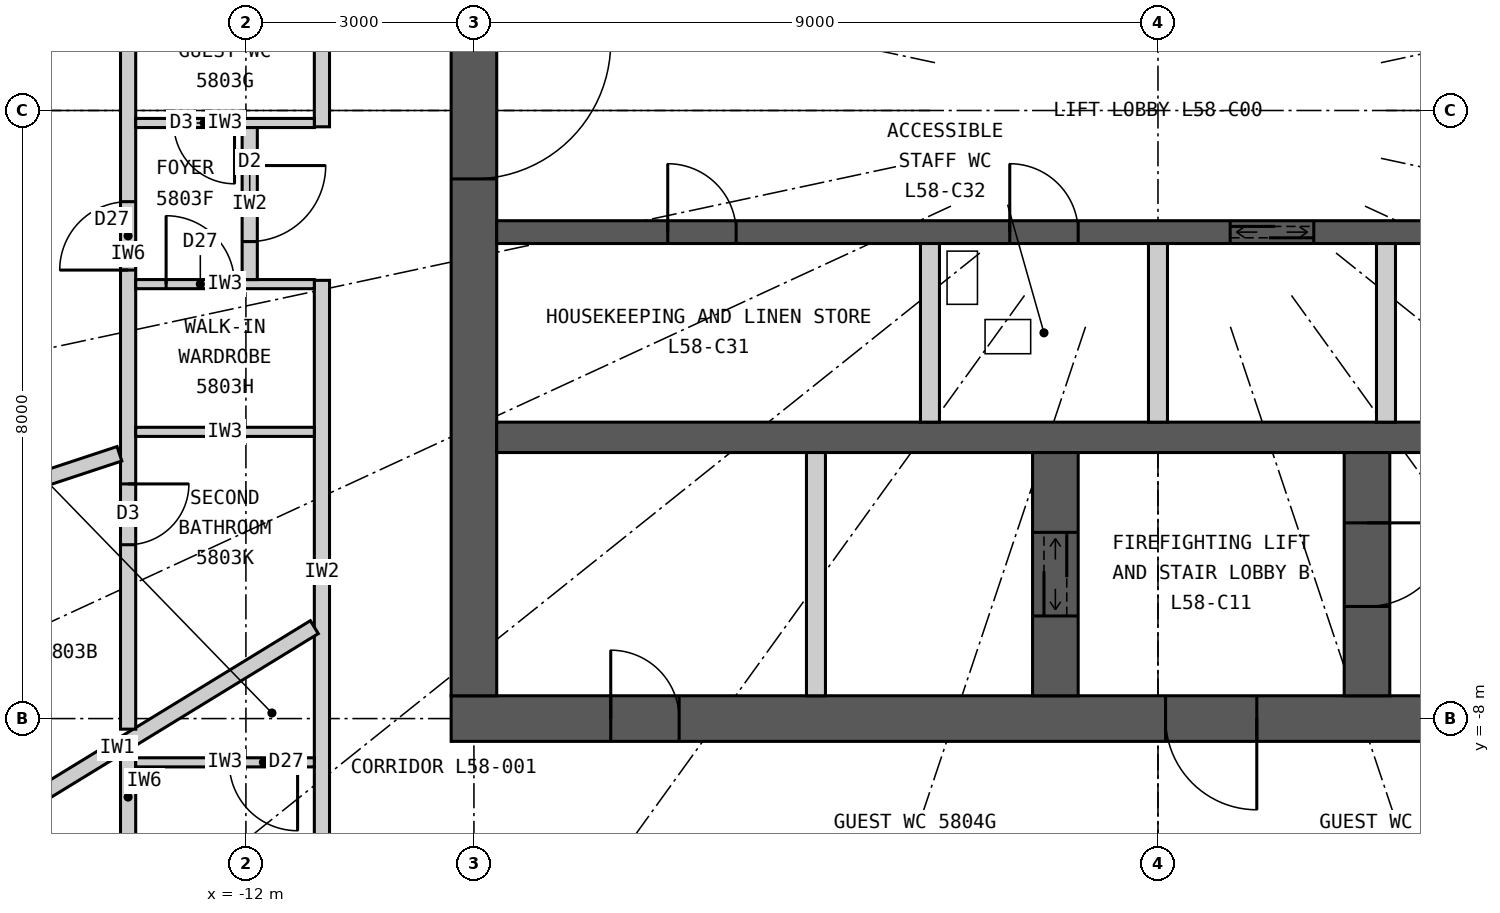
"""IFC4 building model, lengths in metres.
Left out: names, types, materials, properties, quantities, classifications, styles, units other than length and angle.
Written with IfcOpenShell. Run it as: python <this file> out.ifc"""

import sys

from ifc_helpers import new_model, si_unit, direction, frame, frame_2d, origin, place, context, subcontext, project, spatial, rectangle, extrude, element, fill, save


model = new_model("IFC4")
c1 = context("Model", 3, precision=1e-05, world=origin(), true_north=direction((0.0, 1.0)))
c2 = subcontext(c1, "Body", "Model", "MODEL_VIEW")
j1 = project(units=[si_unit("LENGTHUNIT", "METRE"), si_unit("PLANEANGLEUNIT", "RADIAN")], contexts=[c1])
p1 = place(None, origin())
s1 = spatial("IfcSite", under=j1, at=p1, CompositionType="ELEMENT")
p2 = place(p1, origin())
s2 = spatial("IfcBuilding", under=s1, at=p2, CompositionType="ELEMENT")
p3 = place(p2, frame((0.0, 0.0, 216.0)))
s3 = spatial("IfcBuildingStorey", under=s2, at=p3, CompositionType="ELEMENT", Elevation=216.0)
p4 = place(p3, frame((9.3, -8.0, 0.0), z_axis=(0.0, 0.0, 1.0), x_axis=(-1.0, 0.0, 0.0)))
e1 = element("IfcWall", 1, at=p4, inside=s3, PredefinedType="SHEAR", context=c2, shape_type="SweptSolid", body=[
    extrude(rectangle(XDim=18.6, YDim=0.6, at=frame_2d((9.3, 0.0))), origin(), (0.0, 0.0, 1.0), 3.3),
])
p5 = place(p4, frame((8.0, 0.0, 0.0)))
e2 = element("IfcOpeningElement", 2, at=p5, cuts=e1, PredefinedType="OPENING", context=c2, shape_type="SweptSolid", body=[
    extrude(rectangle(XDim=1.2, YDim=2.2, at=frame_2d((0.6, 1.1))), frame((0.0, 0.31, 0.0), z_axis=(0.0, -1.0, 0.0), x_axis=(1.0, 0.0, 0.0)), (0.0, 0.0, 1.0), 0.62),
])
p6 = place(p4, frame((15.6, 0.0, 0.0)))
e3 = element("IfcOpeningElement", 3, at=p6, cuts=e1, PredefinedType="OPENING", context=c2, shape_type="SweptSolid", body=[
    extrude(rectangle(XDim=0.9, YDim=2.2, at=frame_2d((0.45, 1.1))), frame((0.0, 0.31, 0.0), z_axis=(0.0, -1.0, 0.0), x_axis=(1.0, 0.0, 0.0)), (0.0, 0.0, 1.0), 0.62),
])
p7 = place(p3, frame((-9.0, 7.7, 0.0), z_axis=(0.0, 0.0, 1.0), x_axis=(0.0, -1.0, 0.0)))
e4 = element("IfcWall", 4, at=p7, inside=s3, PredefinedType="SHEAR", context=c2, shape_type="SweptSolid", body=[
    extrude(rectangle(XDim=15.4, YDim=0.6, at=frame_2d((7.7, 0.0))), origin(), (0.0, 0.0, 1.0), 3.3),
])
p8 = place(p7, frame((6.8, 0.0, 0.0)))
e5 = element("IfcOpeningElement", 5, at=p8, cuts=e4, PredefinedType="OPENING", context=c2, shape_type="SweptSolid", body=[
    extrude(rectangle(XDim=1.8, YDim=2.2, at=frame_2d((0.9, 1.1))), frame((0.0, 0.31, 0.0), z_axis=(0.0, -1.0, 0.0), x_axis=(1.0, 0.0, 0.0)), (0.0, 0.0, 1.0), 0.62),
])
p9 = place(p3, frame((-8.7, -4.3, 0.0), z_axis=(0.0, 0.0, 1.0), x_axis=(1.0, 0.0, 0.0)))
e6 = element("IfcWall", 6, at=p9, inside=s3, PredefinedType="SHEAR", context=c2, shape_type="SweptSolid", body=[
    extrude(rectangle(XDim=17.4, YDim=0.4, at=frame_2d((8.7, 0.0))), origin(), (0.0, 0.0, 1.0), 3.3),
])
p10 = place(p3, frame((-8.7, -1.6, 0.0), z_axis=(0.0, 0.0, 1.0), x_axis=(1.0, 0.0, 0.0)))
e7 = element("IfcWall", 7, at=p10, inside=s3, PredefinedType="SHEAR", context=c2, shape_type="SweptSolid", body=[
    extrude(rectangle(XDim=17.4, YDim=0.3, at=frame_2d((8.7, 0.0))), origin(), (0.0, 0.0, 1.0), 3.3),
])
p11 = place(p10, frame((9.65, 0.0, 0.0)))
e8 = element("IfcOpeningElement", 8, at=p11, cuts=e7, PredefinedType="OPENING", context=c2, shape_type="SweptSolid", body=[
    extrude(rectangle(XDim=1.1, YDim=2.2, at=frame_2d((0.55, 1.1))), frame((0.0, 0.16, 0.0), z_axis=(0.0, -1.0, 0.0), x_axis=(1.0, 0.0, 0.0)), (0.0, 0.0, 1.0), 0.32),
])
p12 = place(p10, frame((12.4, 0.0, 0.0)))
e9 = element("IfcOpeningElement", 9, at=p12, cuts=e7, PredefinedType="OPENING", context=c2, shape_type="SweptSolid", body=[
    extrude(rectangle(XDim=1.6, YDim=2.4, at=frame_2d((0.8, 1.2))), frame((0.0, 0.16, 0.0), z_axis=(0.0, -1.0, 0.0), x_axis=(1.0, 0.0, 0.0)), (0.0, 0.0, 1.0), 0.32),
])
p13 = place(p10, frame((2.25, 0.0, 0.0)))
e10 = element("IfcOpeningElement", 10, at=p13, cuts=e7, PredefinedType="OPENING", context=c2, shape_type="SweptSolid", body=[
    extrude(rectangle(XDim=0.9, YDim=2.2, at=frame_2d((0.45, 1.1))), frame((0.0, 0.16, 0.0), z_axis=(0.0, -1.0, 0.0), x_axis=(1.0, 0.0, 0.0)), (0.0, 0.0, 1.0), 0.32),
])
p14 = place(p10, frame((6.75, 0.0, 0.0)))
e11 = element("IfcOpeningElement", 11, at=p14, cuts=e7, PredefinedType="OPENING", context=c2, shape_type="SweptSolid", body=[
    extrude(rectangle(XDim=0.9, YDim=2.2, at=frame_2d((0.45, 1.1))), frame((0.0, 0.16, 0.0), z_axis=(0.0, -1.0, 0.0), x_axis=(1.0, 0.0, 0.0)), (0.0, 0.0, 1.0), 0.32),
])
p15 = place(p3, frame((2.75, -7.7, 0.0), z_axis=(0.0, 0.0, 1.0), x_axis=(0.0, 1.0, 0.0)))
e12 = element("IfcWall", 12, at=p15, inside=s3, PredefinedType="SHEAR", context=c2, shape_type="SweptSolid", body=[
    extrude(rectangle(XDim=3.2, YDim=0.6, at=frame_2d((1.6, 0.0))), origin(), (0.0, 0.0, 1.0), 3.3),
])
p16 = place(p15, frame((1.175, 0.0, 0.0)))
e13 = element("IfcOpeningElement", 13, at=p16, cuts=e12, PredefinedType="OPENING", context=c2, shape_type="SweptSolid", body=[
    extrude(rectangle(XDim=1.1, YDim=2.2, at=frame_2d((0.55, 1.1))), frame((0.0, 0.31, 0.0), z_axis=(0.0, -1.0, 0.0), x_axis=(1.0, 0.0, 0.0)), (0.0, 0.0, 1.0), 0.62),
])
p17 = place(p3, frame((-1.35, -7.7, 0.0), z_axis=(0.0, 0.0, 1.0), x_axis=(0.0, 1.0, 0.0)))
e14 = element("IfcWall", 14, at=p17, inside=s3, PredefinedType="SHEAR", context=c2, shape_type="SweptSolid", body=[
    extrude(rectangle(XDim=3.2, YDim=0.6, at=frame_2d((1.6, 0.0))), origin(), (0.0, 0.0, 1.0), 3.3),
])
p18 = place(p17, frame((1.05, 0.0, 0.0)))
e15 = element("IfcOpeningElement", 15, at=p18, cuts=e14, PredefinedType="OPENING", context=c2, shape_type="SweptSolid", body=[
    extrude(rectangle(XDim=1.1, YDim=2.2, at=frame_2d((0.55, 1.1))), frame((0.0, 0.31, 0.0), z_axis=(0.0, -1.0, 0.0), x_axis=(1.0, 0.0, 0.0)), (0.0, 0.0, 1.0), 0.62),
])
p19 = place(p3, frame((-4.5, -7.7, 0.0), z_axis=(0.0, 0.0, 1.0), x_axis=(0.0, 1.0, 0.0)))
e16 = element("IfcWall", 16, at=p19, inside=s3, PredefinedType="PARTITIONING", context=c2, shape_type="SweptSolid", body=[
    extrude(rectangle(XDim=3.2, YDim=0.25, at=frame_2d((1.6, 0.0))), origin(), (0.0, 0.0, 1.0), 3.3),
])
for number, where, z_axis, x_axis in (
    (17, (-3.0, -4.1, 0.0), (0.0, 0.0, 1.0), (0.0, 1.0, 0.0)),
    (18, (0.0, -4.1, 0.0), (0.0, 0.0, 1.0), (0.0, 1.0, 0.0)),
    (19, (3.0, -4.1, 0.0), (0.0, 0.0, 1.0), (0.0, 1.0, 0.0)),
):
    element("IfcWall", number, at=place(p3, frame(where, z_axis=z_axis, x_axis=x_axis)), inside=s3, PredefinedType="PARTITIONING", context=c2, shape_type="SweptSolid", body=[
        extrude(rectangle(XDim=2.35, YDim=0.25, at=frame_2d((1.175, 0.0))), origin(), (0.0, 0.0, 1.0), 3.3),
    ])
p20 = place(p3, frame((-11.0, 9.9, 0.0), z_axis=(0.0, 0.0, 1.0), x_axis=(0.0, -1.0, 0.0)))
e20 = element("IfcWall", 20, at=p20, inside=s3, PredefinedType="PARTITIONING", context=c2, shape_type="SweptSolid", body=[
    extrude(rectangle(XDim=10.114, YDim=0.2, at=frame_2d((5.057, 0.0))), origin(), (0.0, 0.0, 1.0), 3.12),
])
p21 = place(p3, frame((-11.0, -2.234, 0.0), z_axis=(0.0, 0.0, 1.0), x_axis=(0.0, -1.0, 0.0)))
e21 = element("IfcWall", 21, at=p21, inside=s3, PredefinedType="PARTITIONING", context=c2, shape_type="SweptSolid", body=[
    extrude(rectangle(XDim=7.666, YDim=0.2, at=frame_2d((3.833, 0.0))), origin(), (0.0, 0.0, 1.0), 3.12),
])
p22 = place(p3, frame((-11.1, -6.797, 0.0), z_axis=(0.0, 0.0, 1.0), x_axis=(-0.852799818179, -0.522237943963, 0.0)))
e22 = element("IfcWall", 22, at=p22, inside=s3, PredefinedType="PARTITIONING", context=c2, shape_type="SweptSolid", body=[
    extrude(rectangle(XDim=6.077, YDim=0.2, at=frame_2d((3.039, 0.0))), origin(), (0.0, 0.0, 1.0), 3.12),
])
p23 = place(p3, frame((-13.55, 4.357, 0.0), z_axis=(0.0, 0.0, 1.0), x_axis=(0.0, -1.0, 0.0)))
e23 = element("IfcWall", 23, at=p23, inside=s3, PredefinedType="PARTITIONING", context=c2, shape_type="SweptSolid", body=[
    extrude(rectangle(XDim=12.496, YDim=0.2, at=frame_2d((6.248, 0.0))), origin(), (0.0, 0.0, 1.0), 3.12),
])
p24 = place(p23, frame((1.92, 0.0, 0.0)))
e24 = element("IfcOpeningElement", 24, at=p24, cuts=e23, PredefinedType="OPENING", context=c2, shape_type="SweptSolid", body=[
    extrude(rectangle(XDim=0.8, YDim=2.1, at=frame_2d((0.4, 1.05))), frame((0.0, 0.11, 0.0), z_axis=(0.0, -1.0, 0.0), x_axis=(1.0, 0.0, 0.0)), (0.0, 0.0, 1.0), 0.22),
])
p25 = place(p23, frame((9.27, 0.0, 0.0)))
e25 = element("IfcOpeningElement", 25, at=p25, cuts=e23, PredefinedType="OPENING", context=c2, shape_type="SweptSolid", body=[
    extrude(rectangle(XDim=0.8, YDim=2.1, at=frame_2d((0.4, 1.05))), frame((0.0, 0.11, 0.0), z_axis=(0.0, -1.0, 0.0), x_axis=(1.0, 0.0, 0.0)), (0.0, 0.0, 1.0), 0.22),
])
p26 = place(p23, frame((5.557, 0.0, 0.0)))
e26 = element("IfcOpeningElement", 26, at=p26, cuts=e23, PredefinedType="OPENING", context=c2, shape_type="SweptSolid", body=[
    extrude(rectangle(XDim=0.9, YDim=2.1, at=frame_2d((0.45, 1.05))), frame((0.0, 0.11, 0.0), z_axis=(0.0, -1.0, 0.0), x_axis=(1.0, 0.0, 0.0)), (0.0, 0.0, 1.0), 0.22),
])
p27 = place(p3, frame((-13.664, -4.516, 0.0), z_axis=(0.0, 0.0, 1.0), x_axis=(-0.949481375941, -0.313823384632, 0.0)))
e27 = element("IfcWall", 27, at=p27, inside=s3, PredefinedType="PARTITIONING", context=c2, shape_type="SweptSolid", body=[
    extrude(rectangle(XDim=5.638, YDim=0.2, at=frame_2d((2.819, 0.0))), origin(), (0.0, 0.0, 1.0), 3.12),
])
p28 = place(p27, frame((1.82, 0.0, 0.0)))
e28 = element("IfcOpeningElement", 28, at=p28, cuts=e27, PredefinedType="OPENING", context=c2, shape_type="SweptSolid", body=[
    extrude(rectangle(XDim=0.9, YDim=2.1, at=frame_2d((0.45, 1.05))), frame((0.0, 0.11, 0.0), z_axis=(0.0, -1.0, 0.0), x_axis=(1.0, 0.0, 0.0)), (0.0, 0.0, 1.0), 0.22),
])
p29 = place(p3, frame((-11.1, -0.164, 0.0), z_axis=(0.0, 0.0, 1.0), x_axis=(-1.0, 0.0, 0.0)))
e29 = element("IfcWall", 29, at=p29, inside=s3, PredefinedType="PARTITIONING", context=c2, shape_type="SweptSolid", body=[
    extrude(rectangle(XDim=2.35, YDim=0.12, at=frame_2d((1.175, 0.0))), origin(), (0.0, 0.0, 1.0), 3.12),
])
p30 = place(p29, frame((1.05, 0.0, 0.0)))
e30 = element("IfcOpeningElement", 30, at=p30, cuts=e29, PredefinedType="OPENING", context=c2, shape_type="SweptSolid", body=[
    extrude(rectangle(XDim=0.8, YDim=2.1, at=frame_2d((0.4, 1.05))), frame((0.0, 0.07, 0.0), z_axis=(0.0, -1.0, 0.0), x_axis=(1.0, 0.0, 0.0)), (0.0, 0.0, 1.0), 0.14),
])
p31 = place(p3, frame((-11.1, -2.284, 0.0), z_axis=(0.0, 0.0, 1.0), x_axis=(-1.0, 0.0, 0.0)))
e31 = element("IfcWall", 31, at=p31, inside=s3, PredefinedType="PARTITIONING", context=c2, shape_type="SweptSolid", body=[
    extrude(rectangle(XDim=2.35, YDim=0.12, at=frame_2d((1.175, 0.0))), origin(), (0.0, 0.0, 1.0), 3.12),
])
p32 = place(p31, frame((1.05, 0.0, 0.0)))
e32 = element("IfcOpeningElement", 32, at=p32, cuts=e31, PredefinedType="OPENING", context=c2, shape_type="SweptSolid", body=[
    extrude(rectangle(XDim=0.9, YDim=2.1, at=frame_2d((0.45, 1.05))), frame((0.0, 0.07, 0.0), z_axis=(0.0, -1.0, 0.0), x_axis=(1.0, 0.0, 0.0)), (0.0, 0.0, 1.0), 0.14),
])
p33 = place(p3, frame((-11.1, -4.228, 0.0), z_axis=(0.0, 0.0, 1.0), x_axis=(-1.0, 0.0, 0.0)))
e33 = element("IfcWall", 33, at=p33, inside=s3, PredefinedType="PARTITIONING", context=c2, shape_type="SweptSolid", body=[
    extrude(rectangle(XDim=2.35, YDim=0.12, at=frame_2d((1.175, 0.0))), origin(), (0.0, 0.0, 1.0), 3.12),
])
p34 = place(p3, frame((-11.95, -0.224, 0.0), z_axis=(0.0, 0.0, 1.0), x_axis=(0.0, -1.0, 0.0)))
e34 = element("IfcWall", 34, at=p34, inside=s3, PredefinedType="PARTITIONING", context=c2, shape_type="SweptSolid", body=[
    extrude(rectangle(XDim=2.0, YDim=0.2, at=frame_2d((1.0, 0.0))), origin(), (0.0, 0.0, 1.0), 3.12),
])
p35 = place(p34, frame((0.5, 0.0, 0.0)))
e35 = element("IfcOpeningElement", 35, at=p35, cuts=e34, PredefinedType="OPENING", context=c2, shape_type="SweptSolid", body=[
    extrude(rectangle(XDim=1.0, YDim=2.2, at=frame_2d((0.5, 1.1))), frame((0.0, 0.11, 0.0), z_axis=(0.0, -1.0, 0.0), x_axis=(1.0, 0.0, 0.0)), (0.0, 0.0, 1.0), 0.22),
])
p36 = place(p3, frame((-13.55, -8.456, 0.0), z_axis=(0.0, 0.0, 1.0), x_axis=(0.0, -1.0, 0.0)))
e36 = element("IfcWall", 36, at=p36, inside=s3, PredefinedType="PARTITIONING", context=c2, shape_type="SweptSolid", body=[
    extrude(rectangle(XDim=1.153, YDim=0.2, at=frame_2d((0.576, 0.0))), origin(), (0.0, 0.0, 1.0), 3.12),
])
p37 = place(p3, frame((-11.1, -8.576, 0.0), z_axis=(0.0, 0.0, 1.0), x_axis=(-1.0, 0.0, 0.0)))
e37 = element("IfcWall", 37, at=p37, inside=s3, PredefinedType="PARTITIONING", context=c2, shape_type="SweptSolid", body=[
    extrude(rectangle(XDim=2.35, YDim=0.12, at=frame_2d((1.175, 0.0))), origin(), (0.0, 0.0, 1.0), 3.12),
])
p38 = place(p37, frame((0.22, 0.0, 0.0)))
e38 = element("IfcOpeningElement", 38, at=p38, cuts=e37, PredefinedType="OPENING", context=c2, shape_type="SweptSolid", body=[
    extrude(rectangle(XDim=0.9, YDim=2.1, at=frame_2d((0.45, 1.05))), frame((0.0, 0.07, 0.0), z_axis=(0.0, -1.0, 0.0), x_axis=(1.0, 0.0, 0.0)), (0.0, 0.0, 1.0), 0.14),
])
p39 = place(p35, origin())
e39 = element("IfcDoor", 39, at=p39, inside=s3, OperationType="SINGLE_SWING_LEFT", PredefinedType="DOOR", context=c2, shape_type="SweptSolid", body=[
    extrude(rectangle(XDim=1.0, YDim=2.2, at=frame_2d((0.5, 1.1))), frame((0.0, 0.025, 0.0), z_axis=(0.0, -1.0, 0.0), x_axis=(1.0, 0.0, 0.0)), (0.0, 0.0, 1.0), 0.05),
])
fill(e35, e39)
p40 = place(p30, origin())
e40 = element("IfcDoor", 40, at=p40, inside=s3, OperationType="SINGLE_SWING_LEFT", PredefinedType="DOOR", context=c2, shape_type="SweptSolid", body=[
    extrude(rectangle(XDim=0.8, YDim=2.1, at=frame_2d((0.4, 1.05))), frame((0.0, 0.025, 0.0), z_axis=(0.0, -1.0, 0.0), x_axis=(1.0, 0.0, 0.0)), (0.0, 0.0, 1.0), 0.05),
])
fill(e30, e40)
p41 = place(p32, origin())
e41 = element("IfcDoor", 41, at=p41, inside=s3, OperationType="SINGLE_SWING_RIGHT", PredefinedType="DOOR", context=c2, shape_type="SweptSolid", body=[
    extrude(rectangle(XDim=0.9, YDim=2.1, at=frame_2d((0.45, 1.05))), frame((0.0, 0.025, 0.0), z_axis=(0.0, -1.0, 0.0), x_axis=(1.0, 0.0, 0.0)), (0.0, 0.0, 1.0), 0.05),
])
fill(e32, e41)
p42 = place(p25, origin())
e42 = element("IfcDoor", 42, at=p42, inside=s3, OperationType="SINGLE_SWING_LEFT", PredefinedType="DOOR", context=c2, shape_type="SweptSolid", body=[
    extrude(rectangle(XDim=0.8, YDim=2.1, at=frame_2d((0.4, 1.05))), frame((0.0, 0.025, 0.0), z_axis=(0.0, -1.0, 0.0), x_axis=(1.0, 0.0, 0.0)), (0.0, 0.0, 1.0), 0.05),
])
fill(e25, e42)
p43 = place(p26, origin())
e43 = element("IfcDoor", 43, at=p43, inside=s3, OperationType="SINGLE_SWING_RIGHT", PredefinedType="DOOR", context=c2, shape_type="SweptSolid", body=[
    extrude(rectangle(XDim=0.9, YDim=2.1, at=frame_2d((0.45, 1.05))), frame((0.0, 0.025, 0.0), z_axis=(0.0, -1.0, 0.0), x_axis=(1.0, 0.0, 0.0)), (0.0, 0.0, 1.0), 0.05),
])
fill(e26, e43)
p44 = place(p38, origin())
e44 = element("IfcDoor", 44, at=p44, inside=s3, OperationType="SINGLE_SWING_LEFT", PredefinedType="DOOR", context=c2, shape_type="SweptSolid", body=[
    extrude(rectangle(XDim=0.9, YDim=2.1, at=frame_2d((0.45, 1.05))), frame((0.0, 0.025, 0.0), z_axis=(0.0, -1.0, 0.0), x_axis=(1.0, 0.0, 0.0)), (0.0, 0.0, 1.0), 0.05),
])
fill(e38, e44)
p45 = place(p5, origin())
e45 = element("IfcDoor", 45, at=p45, inside=s3, OperationType="SINGLE_SWING_LEFT", PredefinedType="DOOR", context=c2, shape_type="SweptSolid", body=[
    extrude(rectangle(XDim=1.2, YDim=2.2, at=frame_2d((0.6, 1.1))), frame((0.0, 0.025, 0.0), z_axis=(0.0, -1.0, 0.0), x_axis=(1.0, 0.0, 0.0)), (0.0, 0.0, 1.0), 0.05),
])
fill(e2, e45)
p46 = place(p16, origin())
e46 = element("IfcDoor", 46, at=p46, inside=s3, OperationType="SINGLE_SWING_RIGHT", PredefinedType="DOOR", context=c2, shape_type="SweptSolid", body=[
    extrude(rectangle(XDim=1.1, YDim=2.2, at=frame_2d((0.55, 1.1))), frame((0.0, 0.025, 0.0), z_axis=(0.0, -1.0, 0.0), x_axis=(1.0, 0.0, 0.0)), (0.0, 0.0, 1.0), 0.05),
])
fill(e13, e46)
p47 = place(p18, origin())
e47 = element("IfcDoor", 47, at=p47, inside=s3, OperationType="DOUBLE_DOOR_SLIDING", PredefinedType="DOOR", context=c2, shape_type="SweptSolid", body=[
    extrude(rectangle(XDim=1.1, YDim=2.2, at=frame_2d((0.55, 1.1))), frame((0.0, 0.025, 0.0), z_axis=(0.0, -1.0, 0.0), x_axis=(1.0, 0.0, 0.0)), (0.0, 0.0, 1.0), 0.05),
])
fill(e15, e47)
p48 = place(p6, origin())
e48 = element("IfcDoor", 48, at=p48, inside=s3, OperationType="SINGLE_SWING_RIGHT", PredefinedType="DOOR", context=c2, shape_type="SweptSolid", body=[
    extrude(rectangle(XDim=0.9, YDim=2.2, at=frame_2d((0.45, 1.1))), frame((0.0, 0.025, 0.0), z_axis=(0.0, -1.0, 0.0), x_axis=(1.0, 0.0, 0.0)), (0.0, 0.0, 1.0), 0.05),
])
fill(e3, e48)
p49 = place(p11, origin())
e49 = element("IfcDoor", 49, at=p49, inside=s3, OperationType="DOUBLE_DOOR_SLIDING", PredefinedType="DOOR", context=c2, shape_type="SweptSolid", body=[
    extrude(rectangle(XDim=1.1, YDim=2.2, at=frame_2d((0.55, 1.1))), frame((0.0, 0.025, 0.0), z_axis=(0.0, -1.0, 0.0), x_axis=(1.0, 0.0, 0.0)), (0.0, 0.0, 1.0), 0.05),
])
fill(e8, e49)
p50 = place(p13, origin())
e50 = element("IfcDoor", 50, at=p50, inside=s3, OperationType="SINGLE_SWING_LEFT", PredefinedType="DOOR", context=c2, shape_type="SweptSolid", body=[
    extrude(rectangle(XDim=0.9, YDim=2.2, at=frame_2d((0.45, 1.1))), frame((0.0, 0.025, 0.0), z_axis=(0.0, -1.0, 0.0), x_axis=(1.0, 0.0, 0.0)), (0.0, 0.0, 1.0), 0.05),
])
fill(e10, e50)
p51 = place(p14, origin())
e51 = element("IfcDoor", 51, at=p51, inside=s3, OperationType="SINGLE_SWING_LEFT", PredefinedType="DOOR", context=c2, shape_type="SweptSolid", body=[
    extrude(rectangle(XDim=0.9, YDim=2.2, at=frame_2d((0.45, 1.1))), frame((0.0, 0.025, 0.0), z_axis=(0.0, -1.0, 0.0), x_axis=(1.0, 0.0, 0.0)), (0.0, 0.0, 1.0), 0.05),
])
fill(e11, e51)
p52 = place(p8, origin())
e52 = element("IfcDoor", 52, at=p52, inside=s3, OperationType="DOUBLE_DOOR_DOUBLE_SWING", PredefinedType="DOOR", context=c2, shape_type="SweptSolid", body=[
    extrude(rectangle(XDim=1.8, YDim=2.2, at=frame_2d((0.9, 1.1))), frame((0.0, 0.025, 0.0), z_axis=(0.0, -1.0, 0.0), x_axis=(1.0, 0.0, 0.0)), (0.0, 0.0, 1.0), 0.05),
])
fill(e5, e52)
save(model, sys.argv[1])
